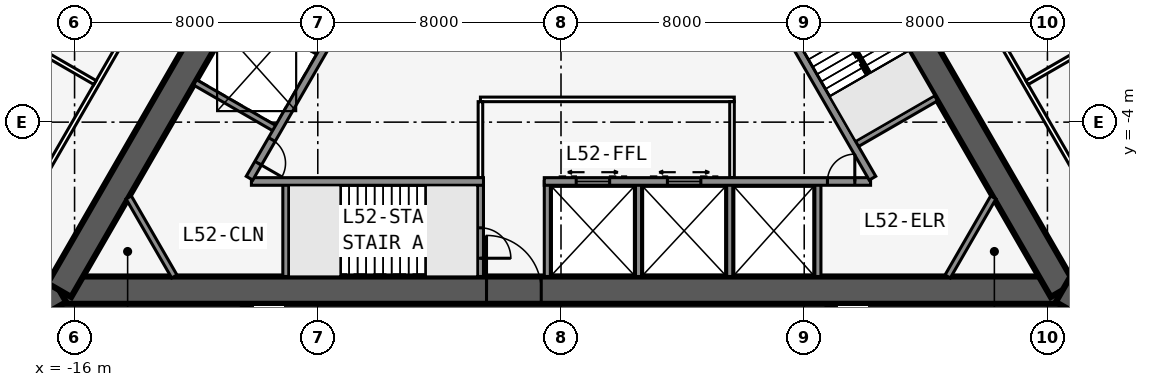
"""IFC4 building model, lengths in metres.
Left out: names, types, materials, properties, quantities, classifications, styles, units other than length and angle.
Written with IfcOpenShell. Run it as: python <this file> out.ifc"""

import sys

from ifc_helpers import new_model, si_unit, direction, frame, frame_2d, origin, place, context, subcontext, project, spatial, rectangle, extrude, element, fill, save


model = new_model("IFC4")
c1 = context("Model", 3, precision=1e-05, world=origin(), true_north=direction((0.0, 1.0)))
c2 = subcontext(c1, "Body", "Model", "MODEL_VIEW")
j1 = project(units=[si_unit("LENGTHUNIT", "METRE"), si_unit("PLANEANGLEUNIT", "RADIAN")], contexts=[c1])
p1 = place(None, origin())
s1 = spatial("IfcSite", under=j1, at=p1, CompositionType="ELEMENT")
p2 = place(p1, origin())
s2 = spatial("IfcBuilding", under=s1, at=p2, CompositionType="ELEMENT")
p3 = place(p2, frame((0.0, 0.0, 195.9)))
s3 = spatial("IfcBuildingStorey", under=s2, at=p3, CompositionType="ELEMENT", Elevation=195.9)
p4 = place(p3, frame((-16.5, -9.526, 0.0), z_axis=(0.0, 0.0, 1.0), x_axis=(1.0, 0.0, 0.0)))
e1 = element("IfcWall", 1, at=p4, inside=s3, PredefinedType="SHEAR", context=c2, shape_type="SweptSolid", body=[
    extrude(rectangle(XDim=33.0, YDim=0.9, at=frame_2d((16.5, 0.0))), origin(), (0.0, 0.0, 1.0), 5.0),
])
p5 = place(p4, frame((14.05, 0.0, 0.0)))
e2 = element("IfcOpeningElement", 2, at=p5, cuts=e1, PredefinedType="OPENING", context=c2, shape_type="SweptSolid", body=[
    extrude(rectangle(XDim=1.8, YDim=2.13, at=frame_2d((0.9, 1.065))), frame((0.0, 0.46, 0.0), z_axis=(0.0, -1.0, 0.0), x_axis=(1.0, 0.0, 0.0)), (0.0, 0.0, 1.0), 0.92),
])
p6 = place(p3, frame((-10.183, -5.951, 0.0), z_axis=(0.0, 0.0, 1.0), x_axis=(1.0, 0.0, 0.0)))
e3 = element("IfcWall", 3, at=p6, inside=s3, PredefinedType="SOLIDWALL", context=c2, shape_type="SweptSolid", body=[
    extrude(rectangle(XDim=7.633, YDim=0.25, at=frame_2d((3.816, 0.0))), origin(), (0.0, 0.0, 1.0), 4.835),
])
p7 = place(p3, frame((-0.55, -5.951, 0.0), z_axis=(0.0, 0.0, 1.0), x_axis=(1.0, 0.0, 0.0)))
e4 = element("IfcWall", 4, at=p7, inside=s3, PredefinedType="SOLIDWALL", context=c2, shape_type="SweptSolid", body=[
    extrude(rectangle(XDim=10.733, YDim=0.25, at=frame_2d((5.366, 0.0))), origin(), (0.0, 0.0, 1.0), 4.835),
])
p8 = place(p7, frame((9.314, 0.0, 0.0)))
e5 = element("IfcOpeningElement", 5, at=p8, cuts=e4, PredefinedType="OPENING", context=c2, shape_type="SweptSolid", body=[
    extrude(rectangle(XDim=0.9, YDim=2.13, at=frame_2d((0.45, 1.065))), frame((0.0, 0.135, 0.0), z_axis=(0.0, -1.0, 0.0), x_axis=(1.0, 0.0, 0.0)), (0.0, 0.0, 1.0), 0.27),
])
p9 = place(p7, frame((1.05, 0.0, 0.0)))
e6 = element("IfcOpeningElement", 6, at=p9, cuts=e4, PredefinedType="OPENING", context=c2, shape_type="SweptSolid", body=[
    extrude(rectangle(XDim=1.1, YDim=2.13, at=frame_2d((0.55, 1.065))), frame((0.0, 0.135, 0.0), z_axis=(0.0, -1.0, 0.0), x_axis=(1.0, 0.0, 0.0)), (0.0, 0.0, 1.0), 0.27),
])
p10 = place(p7, frame((4.05, 0.0, 0.0)))
e7 = element("IfcOpeningElement", 7, at=p10, cuts=e4, PredefinedType="OPENING", context=c2, shape_type="SweptSolid", body=[
    extrude(rectangle(XDim=1.1, YDim=2.13, at=frame_2d((0.55, 1.065))), frame((0.0, 0.135, 0.0), z_axis=(0.0, -1.0, 0.0), x_axis=(1.0, 0.0, 0.0)), (0.0, 0.0, 1.0), 0.27),
])
p11 = place(p3, frame((-9.05, -5.951, 0.0), z_axis=(0.0, 0.0, 1.0), x_axis=(0.0, -1.0, 0.0)))
e8 = element("IfcWall", 8, at=p11, inside=s3, PredefinedType="SOLIDWALL", context=c2, shape_type="SweptSolid", body=[
    extrude(rectangle(XDim=3.125, YDim=0.2, at=frame_2d((1.562, 0.0))), origin(), (0.0, 0.0, 1.0), 4.835),
])
p12 = place(p3, frame((-2.65, -5.951, 0.0), z_axis=(0.0, 0.0, 1.0), x_axis=(0.0, -1.0, 0.0)))
e9 = element("IfcWall", 9, at=p12, inside=s3, PredefinedType="SOLIDWALL", context=c2, shape_type="SweptSolid", body=[
    extrude(rectangle(XDim=3.125, YDim=0.2, at=frame_2d((1.562, 0.0))), origin(), (0.0, 0.0, 1.0), 4.835),
])
p13 = place(p12, frame((1.525, 0.0, 0.0)))
e10 = element("IfcOpeningElement", 10, at=p13, cuts=e9, PredefinedType="OPENING", context=c2, shape_type="SweptSolid", body=[
    extrude(rectangle(XDim=1.0, YDim=2.13, at=frame_2d((0.5, 1.065))), frame((0.0, 0.11, 0.0), z_axis=(0.0, -1.0, 0.0), x_axis=(1.0, 0.0, 0.0)), (0.0, 0.0, 1.0), 0.22),
])
for number, where, z_axis, x_axis in (
    (11, (-0.45, -5.951, 0.0), (0.0, 0.0, 1.0), (0.0, -1.0, 0.0)),
    (12, (2.55, -5.951, 0.0), (0.0, 0.0, 1.0), (0.0, -1.0, 0.0)),
    (13, (5.55, -5.951, 0.0), (0.0, 0.0, 1.0), (0.0, -1.0, 0.0)),
    (14, (8.45, -5.951, 0.0), (0.0, 0.0, 1.0), (0.0, -1.0, 0.0)),
):
    element("IfcWall", number, at=place(p3, frame(where, z_axis=z_axis, x_axis=x_axis)), inside=s3, PredefinedType="SOLIDWALL", context=c2, shape_type="SweptSolid", body=[
        extrude(rectangle(XDim=3.125, YDim=0.2, at=frame_2d((1.562, 0.0))), origin(), (0.0, 0.0, 1.0), 4.835),
    ])
p14 = place(p3, frame((16.5, -9.526, 0.0), z_axis=(0.0, 0.0, 1.0), x_axis=(-0.499999749417, 0.866025548458, 0.0)))
e15 = element("IfcWall", 15, at=p14, inside=s3, PredefinedType="SHEAR", context=c2, shape_type="SweptSolid", body=[
    extrude(rectangle(XDim=33.0, YDim=0.9, at=frame_2d((16.5, 0.0))), origin(), (0.0, 0.0, 1.0), 5.0),
])
p15 = place(p14, frame((14.15, 0.0, 0.0)))
e16 = element("IfcOpeningElement", 16, at=p15, cuts=e15, PredefinedType="OPENING", context=c2, shape_type="SweptSolid", body=[
    extrude(rectangle(XDim=1.8, YDim=2.13, at=frame_2d((0.9, 1.065))), frame((0.0, 0.46, 0.0), z_axis=(0.0, -1.0, 0.0), x_axis=(1.0, 0.0, 0.0)), (0.0, 0.0, 1.0), 0.92),
])
p16 = place(p14, frame((12.6, 0.0, 0.0)))
e17 = element("IfcOpeningElement", 17, at=p16, cuts=e15, PredefinedType="OPENING", context=c2, shape_type="SweptSolid", body=[
    extrude(rectangle(XDim=1.0, YDim=2.13, at=frame_2d((0.5, 1.065))), frame((0.0, 0.46, 0.0), z_axis=(0.0, -1.0, 0.0), x_axis=(1.0, 0.0, 0.0)), (0.0, 0.0, 1.0), 0.92),
])
p17 = place(p3, frame((10.245, -5.843, 0.0), z_axis=(0.0, 0.0, 1.0), x_axis=(-0.499993009313, 0.866029439822, 0.0)))
e18 = element("IfcWall", 18, at=p17, inside=s3, PredefinedType="SOLIDWALL", context=c2, shape_type="SweptSolid", body=[
    extrude(rectangle(XDim=7.733, YDim=0.25, at=frame_2d((3.866, 0.0))), origin(), (0.0, 0.0, 1.0), 4.835),
])
p18 = place(p3, frame((9.629, -4.775, 0.0), z_axis=(0.0, 0.0, 1.0), x_axis=(0.866022959057, 0.500004234368, 0.0)))
e19 = element("IfcWall", 19, at=p18, inside=s3, PredefinedType="SOLIDWALL", context=c2, shape_type="SweptSolid", body=[
    extrude(rectangle(XDim=3.125, YDim=0.2, at=frame_2d((1.562, 0.0))), origin(), (0.0, 0.0, 1.0), 4.835),
])
p19 = place(p3, frame((0.0, 19.052, 0.0), z_axis=(0.0, 0.0, 1.0), x_axis=(-0.499999749417, -0.866025548458, 0.0)))
e20 = element("IfcWall", 20, at=p19, inside=s3, PredefinedType="SHEAR", context=c2, shape_type="SweptSolid", body=[
    extrude(rectangle(XDim=33.0, YDim=0.9, at=frame_2d((16.5, 0.0))), origin(), (0.0, 0.0, 1.0), 5.0),
])
p20 = place(p19, frame((14.15, 0.0, 0.0)))
e21 = element("IfcOpeningElement", 21, at=p20, cuts=e20, PredefinedType="OPENING", context=c2, shape_type="SweptSolid", body=[
    extrude(rectangle(XDim=1.8, YDim=2.13, at=frame_2d((0.9, 1.065))), frame((0.0, 0.46, 0.0), z_axis=(0.0, -1.0, 0.0), x_axis=(1.0, 0.0, 0.0)), (0.0, 0.0, 1.0), 0.92),
])
p21 = place(p19, frame((12.6, 0.0, 0.0)))
e22 = element("IfcOpeningElement", 22, at=p21, cuts=e20, PredefinedType="OPENING", context=c2, shape_type="SweptSolid", body=[
    extrude(rectangle(XDim=1.0, YDim=2.13, at=frame_2d((0.5, 1.065))), frame((0.0, 0.46, 0.0), z_axis=(0.0, -1.0, 0.0), x_axis=(1.0, 0.0, 0.0)), (0.0, 0.0, 1.0), 0.92),
])
p22 = place(p3, frame((-4.929, 3.365, 0.0), z_axis=(0.0, 0.0, 1.0), x_axis=(-0.499991433582, -0.866030349552, 0.0)))
e23 = element("IfcWall", 23, at=p22, inside=s3, PredefinedType="SOLIDWALL", context=c2, shape_type="SweptSolid", body=[
    extrude(rectangle(XDim=10.633, YDim=0.25, at=frame_2d((5.316, 0.0))), origin(), (0.0, 0.0, 1.0), 4.835),
])
p23 = place(p22, frame((9.164, 0.0, 0.0)))
e24 = element("IfcOpeningElement", 24, at=p23, cuts=e23, PredefinedType="OPENING", context=c2, shape_type="SweptSolid", body=[
    extrude(rectangle(XDim=0.9, YDim=2.13, at=frame_2d((0.45, 1.065))), frame((0.0, 0.135, 0.0), z_axis=(0.0, -1.0, 0.0), x_axis=(1.0, 0.0, 0.0)), (0.0, 0.0, 1.0), 0.27),
])
p24 = place(p22, frame((1.0, 0.0, 0.0)))
e25 = element("IfcOpeningElement", 25, at=p24, cuts=e23, PredefinedType="OPENING", context=c2, shape_type="SweptSolid", body=[
    extrude(rectangle(XDim=1.1, YDim=2.13, at=frame_2d((0.55, 1.065))), frame((0.0, 0.135, 0.0), z_axis=(0.0, -1.0, 0.0), x_axis=(1.0, 0.0, 0.0)), (0.0, 0.0, 1.0), 0.27),
])
p25 = place(p22, frame((3.9, 0.0, 0.0)))
e26 = element("IfcOpeningElement", 26, at=p25, cuts=e23, PredefinedType="OPENING", context=c2, shape_type="SweptSolid", body=[
    extrude(rectangle(XDim=1.1, YDim=2.13, at=frame_2d((0.55, 1.065))), frame((0.0, 0.135, 0.0), z_axis=(0.0, -1.0, 0.0), x_axis=(1.0, 0.0, 0.0)), (0.0, 0.0, 1.0), 0.27),
])
for number, where, z_axis, x_axis in (
    (27, (-7.879, -1.744, 0.0), (0.0, 0.0, 1.0), (-0.866, 0.5, 0.0)),
    (28, (-9.329, -4.256, 0.0), (0.0, 0.0, 1.0), (-0.866, 0.5, 0.0)),
):
    element("IfcWall", number, at=place(p3, frame(where, z_axis=z_axis, x_axis=x_axis)), inside=s3, PredefinedType="SOLIDWALL", context=c2, shape_type="SweptSolid", body=[
        extrude(rectangle(XDim=3.125, YDim=0.2, at=frame_2d((1.562, 0.0))), origin(), (0.0, 0.0, 1.0), 4.835),
    ])
p26 = place(p3, frame((16.5, -9.526, 0.0), z_axis=(0.0, 0.0, 1.0), x_axis=(0.866031398331, -0.499989616998, 0.0)))
e29 = element("IfcWall", 29, at=p26, inside=s3, PredefinedType="SHEAR", context=c2, shape_type="SweptSolid", body=[
    extrude(rectangle(XDim=4.746, YDim=0.9, at=frame_2d((2.373, 0.0))), origin(), (0.0, 0.0, 1.0), 5.0),
])
p27 = place(p26, frame((1.8, 0.0, 0.0)))
e30 = element("IfcOpeningElement", 30, at=p27, cuts=e29, PredefinedType="OPENING", context=c2, shape_type="SweptSolid", body=[
    extrude(rectangle(XDim=1.8, YDim=2.13, at=frame_2d((0.9, 1.065))), frame((0.0, 0.46, 0.0), z_axis=(0.0, -1.0, 0.0), x_axis=(1.0, 0.0, 0.0)), (0.0, 0.0, 1.0), 0.92),
])
p28 = place(p3, frame((-16.5, -9.526, 0.0), z_axis=(0.0, 0.0, 1.0), x_axis=(-0.866031398331, -0.499989616998, 0.0)))
e31 = element("IfcWall", 31, at=p28, inside=s3, PredefinedType="SHEAR", context=c2, shape_type="SweptSolid", body=[
    extrude(rectangle(XDim=4.746, YDim=0.9, at=frame_2d((2.373, 0.0))), origin(), (0.0, 0.0, 1.0), 5.0),
])
p29 = place(p28, frame((1.8, 0.0, 0.0)))
e32 = element("IfcOpeningElement", 32, at=p29, cuts=e31, PredefinedType="OPENING", context=c2, shape_type="SweptSolid", body=[
    extrude(rectangle(XDim=1.8, YDim=2.13, at=frame_2d((0.9, 1.065))), frame((0.0, 0.46, 0.0), z_axis=(0.0, -1.0, 0.0), x_axis=(1.0, 0.0, 0.0)), (0.0, 0.0, 1.0), 0.92),
])
p30 = place(p3, frame((20.027, -10.985, 0.0), z_axis=(0.0, 0.0, 1.0), x_axis=(-0.500001677587, 0.866024435227, 0.0)))
e33 = element("IfcWall", 33, at=p30, inside=s3, PredefinedType="PARTITIONING", context=c2, shape_type="SweptSolid", body=[
    extrude(rectangle(XDim=39.054, YDim=0.15, at=frame_2d((19.527, 0.0))), origin(), (0.0, 0.0, 1.0), 4.835),
])
p31 = place(p30, frame((4.414, 0.0, 0.0)))
e34 = element("IfcOpeningElement", 34, at=p31, cuts=e33, PredefinedType="OPENING", context=c2, shape_type="SweptSolid", body=[
    extrude(rectangle(XDim=1.0, YDim=2.13, at=frame_2d((0.5, 1.065))), frame((0.0, 0.085, 0.0), z_axis=(0.0, -1.0, 0.0), x_axis=(1.0, 0.0, 0.0)), (0.0, 0.0, 1.0), 0.17),
])
p32 = place(p30, frame((14.027, 0.0, 0.0)))
e35 = element("IfcOpeningElement", 35, at=p32, cuts=e33, PredefinedType="OPENING", context=c2, shape_type="SweptSolid", body=[
    extrude(rectangle(XDim=1.0, YDim=2.13, at=frame_2d((0.5, 1.065))), frame((0.0, 0.085, 0.0), z_axis=(0.0, -1.0, 0.0), x_axis=(1.0, 0.0, 0.0)), (0.0, 0.0, 1.0), 0.17),
])
p33 = place(p30, frame((24.027, 0.0, 0.0)))
e36 = element("IfcOpeningElement", 36, at=p33, cuts=e33, PredefinedType="OPENING", context=c2, shape_type="SweptSolid", body=[
    extrude(rectangle(XDim=1.0, YDim=2.13, at=frame_2d((0.5, 1.065))), frame((0.0, 0.085, 0.0), z_axis=(0.0, -1.0, 0.0), x_axis=(1.0, 0.0, 0.0)), (0.0, 0.0, 1.0), 0.17),
])
p34 = place(p30, frame((33.64, 0.0, 0.0)))
e37 = element("IfcOpeningElement", 37, at=p34, cuts=e33, PredefinedType="OPENING", context=c2, shape_type="SweptSolid", body=[
    extrude(rectangle(XDim=1.0, YDim=2.13, at=frame_2d((0.5, 1.065))), frame((0.0, 0.085, 0.0), z_axis=(0.0, -1.0, 0.0), x_axis=(1.0, 0.0, 0.0)), (0.0, 0.0, 1.0), 0.17),
])
p35 = place(p3, frame((15.329, -2.697, 0.0), z_axis=(0.0, 0.0, 1.0), x_axis=(0.866032463813, 0.499987771473, 0.0)))
e38 = element("IfcWall", 38, at=p35, inside=s3, PredefinedType="PARTITIONING", context=c2, shape_type="SweptSolid", body=[
    extrude(rectangle(XDim=7.355, YDim=0.15, at=frame_2d((3.677, 0.0))), origin(), (0.0, 0.0, 1.0), 3.989),
])
p36 = place(p3, frame((-0.5, 22.836, 0.0), z_axis=(0.0, 0.0, 1.0), x_axis=(-0.500001677587, -0.866024435227, 0.0)))
e39 = element("IfcWall", 39, at=p36, inside=s3, PredefinedType="PARTITIONING", context=c2, shape_type="SweptSolid", body=[
    extrude(rectangle(XDim=39.054, YDim=0.15, at=frame_2d((19.527, 0.0))), origin(), (0.0, 0.0, 1.0), 4.835),
])
p37 = place(p36, frame((4.414, 0.0, 0.0)))
e40 = element("IfcOpeningElement", 40, at=p37, cuts=e39, PredefinedType="OPENING", context=c2, shape_type="SweptSolid", body=[
    extrude(rectangle(XDim=1.0, YDim=2.13, at=frame_2d((0.5, 1.065))), frame((0.0, 0.085, 0.0), z_axis=(0.0, -1.0, 0.0), x_axis=(1.0, 0.0, 0.0)), (0.0, 0.0, 1.0), 0.17),
])
p38 = place(p36, frame((10.527, 0.0, 0.0)))
e41 = element("IfcOpeningElement", 41, at=p38, cuts=e39, PredefinedType="OPENING", context=c2, shape_type="SweptSolid", body=[
    extrude(rectangle(XDim=1.0, YDim=2.13, at=frame_2d((0.5, 1.065))), frame((0.0, 0.085, 0.0), z_axis=(0.0, -1.0, 0.0), x_axis=(1.0, 0.0, 0.0)), (0.0, 0.0, 1.0), 0.17),
])
p39 = place(p36, frame((15.527, 0.0, 0.0)))
e42 = element("IfcOpeningElement", 42, at=p39, cuts=e39, PredefinedType="OPENING", context=c2, shape_type="SweptSolid", body=[
    extrude(rectangle(XDim=1.0, YDim=2.13, at=frame_2d((0.5, 1.065))), frame((0.0, 0.085, 0.0), z_axis=(0.0, -1.0, 0.0), x_axis=(1.0, 0.0, 0.0)), (0.0, 0.0, 1.0), 0.17),
])
p40 = place(p36, frame((24.027, 0.0, 0.0)))
e43 = element("IfcOpeningElement", 43, at=p40, cuts=e39, PredefinedType="OPENING", context=c2, shape_type="SweptSolid", body=[
    extrude(rectangle(XDim=1.0, YDim=2.13, at=frame_2d((0.5, 1.065))), frame((0.0, 0.085, 0.0), z_axis=(0.0, -1.0, 0.0), x_axis=(1.0, 0.0, 0.0)), (0.0, 0.0, 1.0), 0.17),
])
p41 = place(p36, frame((33.64, 0.0, 0.0)))
e44 = element("IfcOpeningElement", 44, at=p41, cuts=e39, PredefinedType="OPENING", context=c2, shape_type="SweptSolid", body=[
    extrude(rectangle(XDim=1.0, YDim=2.13, at=frame_2d((0.5, 1.065))), frame((0.0, 0.085, 0.0), z_axis=(0.0, -1.0, 0.0), x_axis=(1.0, 0.0, 0.0)), (0.0, 0.0, 1.0), 0.17),
])
p42 = place(p3, frame((-15.329, -2.697, 0.0), z_axis=(0.0, 0.0, 1.0), x_axis=(-0.866032463813, 0.499987771473, 0.0)))
e45 = element("IfcWall", 45, at=p42, inside=s3, PredefinedType="PARTITIONING", context=c2, shape_type="SweptSolid", body=[
    extrude(rectangle(XDim=7.355, YDim=0.15, at=frame_2d((3.677, 0.0))), origin(), (0.0, 0.0, 1.0), 3.989),
])
p43 = place(p3, frame((-2.65, -3.251, 0.0), z_axis=(0.0, 0.0, 1.0), x_axis=(1.0, 0.0, 0.0)))
e46 = element("IfcWall", 46, at=p43, inside=s3, PredefinedType="PARTITIONING", context=c2, shape_type="SweptSolid", body=[
    extrude(rectangle(XDim=8.35, YDim=0.15, at=frame_2d((4.175, 0.0))), origin(), (0.0, 0.0, 1.0), 4.835),
])
for number, where, z_axis, x_axis in (
    (47, (-2.65, -5.826, 0.0), (0.0, 0.0, 1.0), (0.0, 1.0, 0.0)),
    (48, (5.625, -5.826, 0.0), (0.0, 0.0, 1.0), (0.0, 1.0, 0.0)),
):
    element("IfcWall", number, at=place(p3, frame(where, z_axis=z_axis, x_axis=x_axis)), inside=s3, PredefinedType="PARTITIONING", context=c2, shape_type="SweptSolid", body=[
        extrude(rectangle(XDim=2.5, YDim=0.15, at=frame_2d((1.25, 0.0))), origin(), (0.0, 0.0, 1.0), 4.835),
    ])
for number, where, z_axis, x_axis in (
    (49, (14.219, -6.476, 0.0), (0.0, 0.0, 1.0), (-0.5, -0.866, 0.0)),
    (50, (-12.719, -9.076, 0.0), (0.0, 0.0, 1.0), (-0.5, 0.866, 0.0)),
):
    element("IfcWall", number, at=place(p3, frame(where, z_axis=z_axis, x_axis=x_axis)), inside=s3, PredefinedType="SOLIDWALL", context=c2, shape_type="SweptSolid", body=[
        extrude(rectangle(XDim=3.002, YDim=0.2, at=frame_2d((1.501, 0.0))), origin(), (0.0, 0.0, 1.0), 4.835),
    ])
p44 = place(p3, frame((-7.247, -7.576, 0.0), z_axis=(0.0, 0.0, 1.0), x_axis=(1.0, 0.0, 0.0)))
e51 = element("IfcWall", 51, at=p44, inside=s3, PredefinedType="SOLIDWALL", context=c2, shape_type="SweptSolid", body=[
    extrude(rectangle(XDim=2.794, YDim=0.1, at=frame_2d((1.397, 0.0))), origin(), (0.0, 0.0, 1.0), 5.0),
])
p45 = place(p3, frame((10.135, -2.401, 0.0), z_axis=(0.0, 0.0, 1.0), x_axis=(-0.499992232847, 0.866029888106, 0.0)))
e52 = element("IfcWall", 52, at=p45, inside=s3, PredefinedType="SOLIDWALL", context=c2, shape_type="SweptSolid", body=[
    extrude(rectangle(XDim=2.794, YDim=0.1, at=frame_2d((1.397, 0.0))), origin(), (0.0, 0.0, 1.0), 5.0),
])
p46 = place(p5, origin())
e53 = element("IfcDoor", 53, at=p46, inside=s3, OperationType="DOUBLE_DOOR_SINGLE_SWING", PredefinedType="DOOR", context=c2, shape_type="SweptSolid", body=[
    extrude(rectangle(XDim=1.8, YDim=2.13, at=frame_2d((0.9, 1.065))), frame((0.0, 0.025, 0.0), z_axis=(0.0, -1.0, 0.0), x_axis=(1.0, 0.0, 0.0)), (0.0, 0.0, 1.0), 0.05),
])
fill(e2, e53)
p47 = place(p13, origin())
e54 = element("IfcDoor", 54, at=p47, inside=s3, OperationType="SINGLE_SWING_RIGHT", PredefinedType="DOOR", context=c2, shape_type="SweptSolid", body=[
    extrude(rectangle(XDim=1.0, YDim=2.13, at=frame_2d((0.5, 1.065))), frame((0.0, 0.025, 0.0), z_axis=(0.0, -1.0, 0.0), x_axis=(1.0, 0.0, 0.0)), (0.0, 0.0, 1.0), 0.05),
])
fill(e10, e54)
p48 = place(p8, origin())
e55 = element("IfcDoor", 55, at=p48, inside=s3, OperationType="SINGLE_SWING_RIGHT", PredefinedType="DOOR", context=c2, shape_type="SweptSolid", body=[
    extrude(rectangle(XDim=0.9, YDim=2.13, at=frame_2d((0.45, 1.065))), frame((0.0, 0.025, 0.0), z_axis=(0.0, -1.0, 0.0), x_axis=(1.0, 0.0, 0.0)), (0.0, 0.0, 1.0), 0.05),
])
fill(e5, e55)
p49 = place(p23, origin())
e56 = element("IfcDoor", 56, at=p49, inside=s3, OperationType="SINGLE_SWING_RIGHT", PredefinedType="DOOR", context=c2, shape_type="SweptSolid", body=[
    extrude(rectangle(XDim=0.9, YDim=2.13, at=frame_2d((0.45, 1.065))), frame((0.0, 0.025, 0.0), z_axis=(0.0, -1.0, 0.0), x_axis=(1.0, 0.0, 0.0)), (0.0, 0.0, 1.0), 0.05),
])
fill(e24, e56)
p50 = place(p9, origin())
e57 = element("IfcDoor", 57, at=p50, inside=s3, OperationType="DOUBLE_DOOR_SLIDING", PredefinedType="USERDEFINED", context=c2, shape_type="SweptSolid", body=[
    extrude(rectangle(XDim=1.1, YDim=2.13, at=frame_2d((0.55, 1.065))), frame((0.0, 0.025, 0.0), z_axis=(0.0, -1.0, 0.0), x_axis=(1.0, 0.0, 0.0)), (0.0, 0.0, 1.0), 0.05),
])
fill(e6, e57)
p51 = place(p10, origin())
e58 = element("IfcDoor", 58, at=p51, inside=s3, OperationType="DOUBLE_DOOR_SLIDING", PredefinedType="USERDEFINED", context=c2, shape_type="SweptSolid", body=[
    extrude(rectangle(XDim=1.1, YDim=2.13, at=frame_2d((0.55, 1.065))), frame((0.0, 0.025, 0.0), z_axis=(0.0, -1.0, 0.0), x_axis=(1.0, 0.0, 0.0)), (0.0, 0.0, 1.0), 0.05),
])
fill(e7, e58)
save(model, sys.argv[1])
